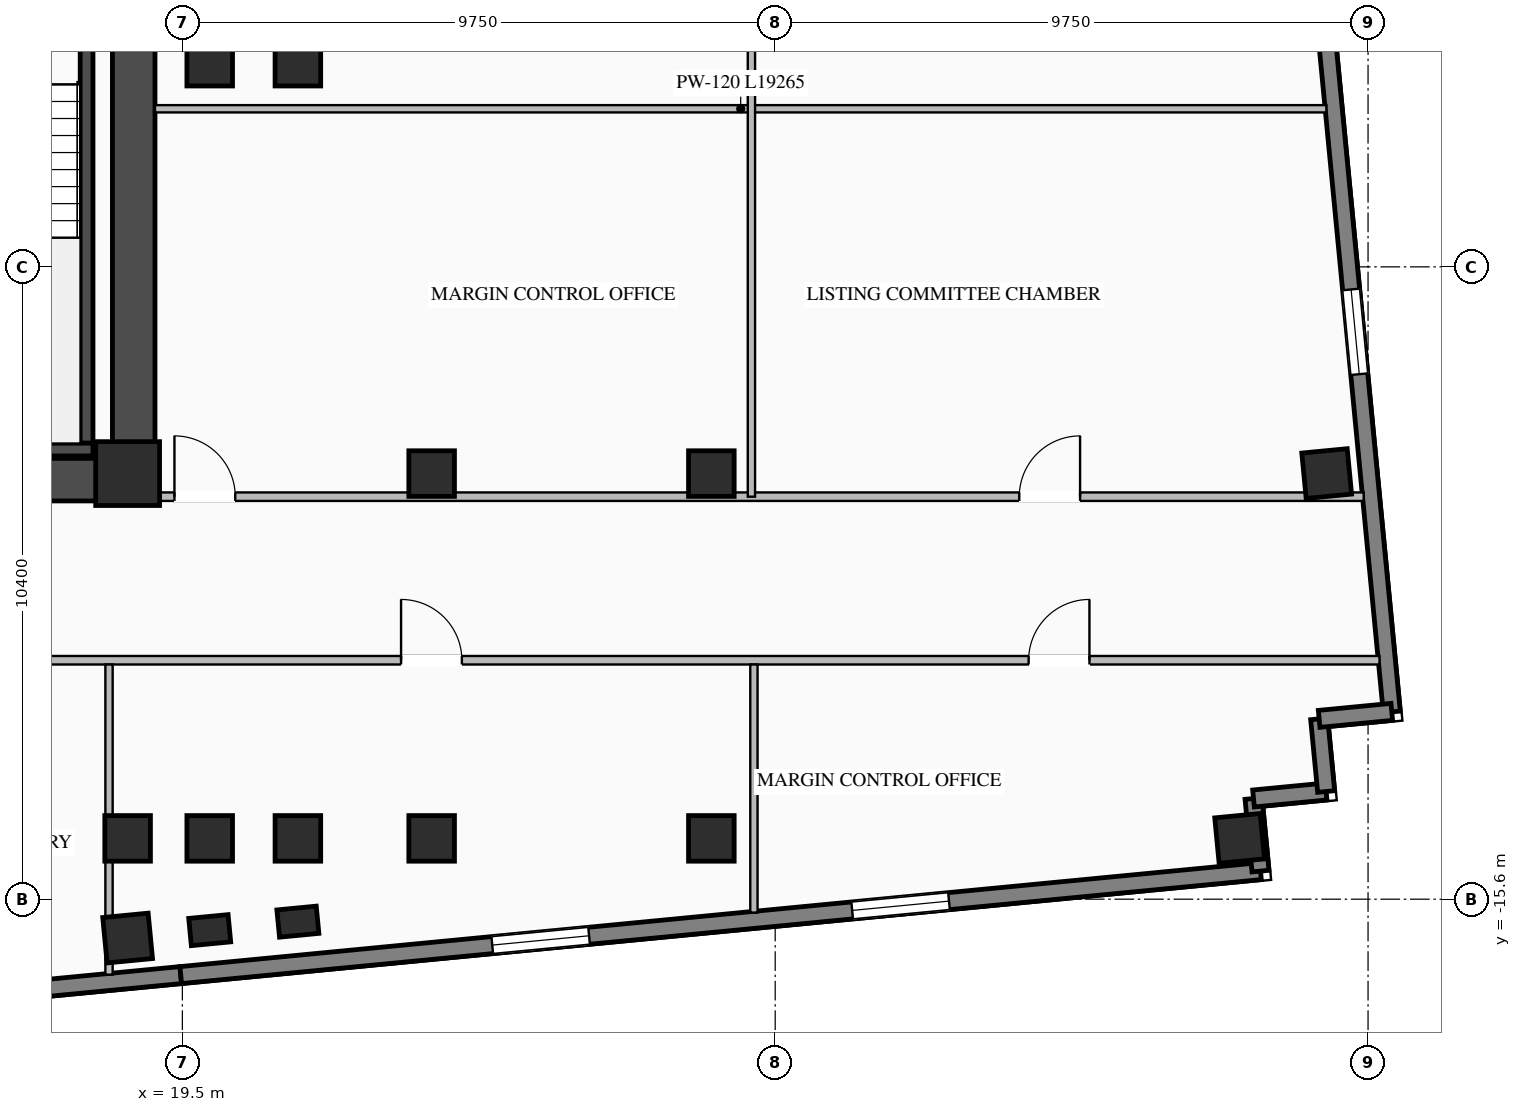
"""IFC4 building model, lengths in metres.
Left out: names, types, materials, properties, quantities, classifications, styles, units other than length and angle.
Written with IfcOpenShell. Run it as: python <this file> out.ifc"""

import sys

from ifc_helpers import new_model, si_unit, direction, frame, frame_2d, origin, origin_2d, place, context, subcontext, project, spatial, rectangle, i_section, extrude, element, fill, save


model = new_model("IFC4")
c1 = context("Model", 3, precision=1e-05, world=origin(), true_north=direction((0.0, 1.0)))
c2 = subcontext(c1, "Body", "Model", "MODEL_VIEW")
j1 = project(units=[si_unit("LENGTHUNIT", "METRE"), si_unit("PLANEANGLEUNIT", "RADIAN")], contexts=[c1])
p1 = place(None, origin())
s1 = spatial("IfcSite", under=j1, at=p1, CompositionType="ELEMENT")
p2 = place(p1, origin())
s2 = spatial("IfcBuilding", under=s1, at=p2, CompositionType="ELEMENT")
p3 = place(p2, frame((0.0, 0.0, 101.8)))
s3 = spatial("IfcBuildingStorey", under=s2, at=p3, CompositionType="ELEMENT", Elevation=101.8)
p4 = place(p3, frame((8.8, -8.7, 0.0), z_axis=(0.0, 0.0, 1.0), x_axis=(1.0, 0.0, 0.0)))
e1 = element("IfcWall", 1, at=p4, inside=s3, PredefinedType="SHEAR", context=c2, shape_type="SweptSolid", body=[
    extrude(rectangle(XDim=10.25, YDim=0.7, at=frame_2d((5.125, 0.0))), origin(), (0.0, 0.0, 1.0), 3.27),
])
p5 = place(p3, frame((18.7, -8.35, 0.0), z_axis=(0.0, 0.0, 1.0), x_axis=(0.0, 1.0, 0.0)))
e2 = element("IfcWall", 2, at=p5, inside=s3, PredefinedType="SHEAR", context=c2, shape_type="SweptSolid", body=[
    extrude(rectangle(XDim=16.7, YDim=0.7, at=frame_2d((8.35, 0.0))), origin(), (0.0, 0.0, 1.0), 3.27),
])
p6 = place(p3, frame((17.925, -8.1, 0.0), z_axis=(0.0, 0.0, 1.0), x_axis=(0.0, 1.0, 0.0)))
e3 = element("IfcWall", 3, at=p6, inside=s3, PredefinedType="SHEAR", context=c2, shape_type="SweptSolid", body=[
    extrude(rectangle(XDim=8.2, YDim=0.21, at=frame_2d((4.1, 0.0))), origin(), (0.0, 0.0, 1.0), 3.27),
])
p7 = place(p3, frame((12.89, -8.205, 0.0), z_axis=(0.0, 0.0, 1.0), x_axis=(1.0, 0.0, 0.0)))
e4 = element("IfcWall", 4, at=p7, inside=s3, PredefinedType="SHEAR", context=c2, shape_type="SweptSolid", body=[
    extrude(rectangle(XDim=5.14, YDim=0.21, at=frame_2d((2.57, 0.0))), origin(), (0.0, 0.0, 1.0), 3.27),
])
p8 = place(p3, frame((18.6, -8.6, 0.0), z_axis=(0.0, 0.0, 1.0), x_axis=(1.0, 0.0, 0.0)))
e5 = element("IfcColumn", 5, at=p8, inside=s3, PredefinedType="COLUMN", context=c2, shape_type="SweptSolid", body=[
    extrude(rectangle(XDim=1.05, YDim=1.05, at=origin_2d()), origin(), (0.0, 0.0, 1.0), 3.45),
])
for number, where, z_axis, x_axis in (
    (6, (18.6, -14.6, 0.0), (0.0, 0.0, 1.0), (1.0, 0.0, 0.0)),
    (7, (19.95, -14.6, 0.0), (0.0, 0.0, 1.0), (1.0, 0.0, 0.0)),
    (8, (21.4, -14.6, 0.0), (0.0, 0.0, 1.0), (1.0, 0.0, 0.0)),
    (9, (19.95, -1.85, 0.0), (0.0, 0.0, 1.0), (1.0, 0.0, 0.0)),
    (10, (21.4, -1.85, 0.0), (0.0, 0.0, 1.0), (1.0, 0.0, 0.0)),
    (11, (23.6, -14.6, 0.0), (0.0, 0.0, 1.0), (1.0, 0.0, 0.0)),
    (12, (23.6, -8.6, 0.0), (0.0, 0.0, 1.0), (1.0, 0.0, 0.0)),
    (13, (28.2, -14.6, 0.0), (0.0, 0.0, 1.0), (1.0, 0.0, 0.0)),
    (14, (28.2, -8.6, 0.0), (0.0, 0.0, 1.0), (1.0, 0.0, 0.0)),
    (15, (18.6, -16.239, 0.0), (0.0, 0.0, 1.0), (0.995, 0.096, 0.0)),
    (16, (36.888, -14.6, 0.0), (0.0, 0.0, 1.0), (0.995, 0.096, 0.0)),
    (17, (38.32, -8.6, 0.0), (0.0, 0.0, 1.0), (0.995, 0.096, 0.0)),
):
    element("IfcColumn", number, at=place(p3, frame(where, z_axis=z_axis, x_axis=x_axis)), inside=s3, PredefinedType="COLUMN", context=c2, shape_type="SweptSolid", body=[
        extrude(i_section(OverallWidth=0.75, OverallDepth=0.75, WebThickness=0.03, FlangeThickness=0.044, at=origin_2d()), origin(), (0.0, 0.0, 1.0), 3.45),
    ])
for number, where, z_axis, x_axis in (
    (18, (19.95, -16.109, 0.0), (0.0, 0.0, 1.0), (0.995, 0.096, 0.0)),
    (19, (21.4, -15.969, 0.0), (0.0, 0.0, 1.0), (0.995, 0.096, 0.0)),
):
    element("IfcColumn", number, at=place(p3, frame(where, z_axis=z_axis, x_axis=x_axis)), inside=s3, PredefinedType="PILASTER", context=c2, shape_type="SweptSolid", body=[
        extrude(rectangle(XDim=0.65, YDim=0.45, at=origin_2d()), origin(), (0.0, 0.0, 1.0), 3.45),
    ])
p9 = place(p3, frame((19.474, -16.848, 0.0), z_axis=(0.0, 0.0, 1.0), x_axis=(-0.995396794462, -0.09583956164, 0.0)))
e20 = element("IfcWall", 20, at=p9, inside=s3, PredefinedType="STANDARD", context=c2, shape_type="SweptSolid", body=[
    extrude(rectangle(XDim=9.0, YDim=0.28, at=frame_2d((4.5, 0.0))), origin(), (0.0, 0.0, 1.0), 3.25),
])
p10 = place(p9, frame((2.2, 0.0, 0.76)))
e21 = element("IfcOpeningElement", 21, at=p10, cuts=e20, PredefinedType="OPENING", context=c2, shape_type="SweptSolid", body=[
    extrude(rectangle(XDim=1.6, YDim=1.95, at=frame_2d((0.8, 0.975))), frame((0.0, 0.15, 0.0), z_axis=(0.0, -1.0, 0.0), x_axis=(1.0, 0.0, 0.0)), (0.0, 0.0, 1.0), 0.3),
])
p11 = place(p9, frame((5.2, 0.0, 0.76)))
e22 = element("IfcOpeningElement", 22, at=p11, cuts=e20, PredefinedType="OPENING", context=c2, shape_type="SweptSolid", body=[
    extrude(rectangle(XDim=1.6, YDim=1.95, at=frame_2d((0.8, 0.975))), frame((0.0, 0.15, 0.0), z_axis=(0.0, -1.0, 0.0), x_axis=(1.0, 0.0, 0.0)), (0.0, 0.0, 1.0), 0.3),
])
p12 = place(p3, frame((37.231, -15.138, 0.0), z_axis=(0.0, 0.0, 1.0), x_axis=(-0.995395780835, -0.095850088663, 0.0)))
e23 = element("IfcWall", 23, at=p12, inside=s3, PredefinedType="STANDARD", context=c2, shape_type="SweptSolid", body=[
    extrude(rectangle(XDim=17.84, YDim=0.28, at=frame_2d((8.92, 0.0))), origin(), (0.0, 0.0, 1.0), 3.25),
])
p13 = place(p12, frame((5.147, 0.0, 0.76)))
e24 = element("IfcOpeningElement", 24, at=p13, cuts=e23, PredefinedType="OPENING", context=c2, shape_type="SweptSolid", body=[
    extrude(rectangle(XDim=1.6, YDim=1.95, at=frame_2d((0.8, 0.975))), frame((0.0, 0.15, 0.0), z_axis=(0.0, -1.0, 0.0), x_axis=(1.0, 0.0, 0.0)), (0.0, 0.0, 1.0), 0.3),
])
p14 = place(p12, frame((11.093, 0.0, 0.76)))
e25 = element("IfcOpeningElement", 25, at=p14, cuts=e23, PredefinedType="OPENING", context=c2, shape_type="SweptSolid", body=[
    extrude(rectangle(XDim=1.6, YDim=1.95, at=frame_2d((0.8, 0.975))), frame((0.0, 0.15, 0.0), z_axis=(0.0, -1.0, 0.0), x_axis=(1.0, 0.0, 0.0)), (0.0, 0.0, 1.0), 0.3),
])
p15 = place(p3, frame((37.585, 6.234, 0.0), z_axis=(0.0, 0.0, 1.0), x_axis=(0.095841297881, -0.99539662729, 0.0)))
e26 = element("IfcWall", 26, at=p15, inside=s3, PredefinedType="STANDARD", context=c2, shape_type="SweptSolid", body=[
    extrude(rectangle(XDim=18.84, YDim=0.28, at=frame_2d((9.42, 0.0))), origin(), (0.0, 0.0, 1.0), 3.25),
])
p16 = place(p15, frame((5.58, 0.0, 0.76)))
e27 = element("IfcOpeningElement", 27, at=p16, cuts=e26, PredefinedType="OPENING", context=c2, shape_type="SweptSolid", body=[
    extrude(rectangle(XDim=1.4, YDim=1.95, at=frame_2d((0.7, 0.975))), frame((0.0, 0.15, 0.0), z_axis=(0.0, -1.0, 0.0), x_axis=(1.0, 0.0, 0.0)), (0.0, 0.0, 1.0), 0.3),
])
p17 = place(p15, frame((11.86, 0.0, 0.76)))
e28 = element("IfcOpeningElement", 28, at=p17, cuts=e26, PredefinedType="OPENING", context=c2, shape_type="SweptSolid", body=[
    extrude(rectangle(XDim=1.4, YDim=1.95, at=frame_2d((0.7, 0.975))), frame((0.0, 0.15, 0.0), z_axis=(0.0, -1.0, 0.0), x_axis=(1.0, 0.0, 0.0)), (0.0, 0.0, 1.0), 0.3),
])
for number, where, z_axis, x_axis in (
    (29, (37.231, -15.138, 0.0), (0.0, 0.0, 1.0), (-0.096, 0.995, 0.0)),
    (30, (37.116, -13.944, 0.0), (0.0, 0.0, 1.0), (0.995, 0.096, 0.0)),
):
    element("IfcWall", number, at=place(p3, frame(where, z_axis=z_axis, x_axis=x_axis)), inside=s3, PredefinedType="STANDARD", context=c2, shape_type="SweptSolid", body=[
        extrude(rectangle(XDim=1.2, YDim=0.28, at=frame_2d((0.6, 0.0))), origin(), (0.0, 0.0, 1.0), 2.495),
    ])
for number, where, z_axis, x_axis in (
    (31, (38.311, -13.829, 0.0), (0.0, 0.0, 1.0), (-0.096, 0.995, 0.0)),
    (32, (38.196, -12.635, 0.0), (0.0, 0.0, 1.0), (0.995, 0.096, 0.0)),
):
    element("IfcWall", number, at=place(p3, frame(where, z_axis=z_axis, x_axis=x_axis)), inside=s3, PredefinedType="STANDARD", context=c2, shape_type="SweptSolid", body=[
        extrude(rectangle(XDim=1.2, YDim=0.28, at=frame_2d((0.6, 0.0))), origin(), (0.0, 0.0, 1.0), 2.495),
    ])
p18 = place(p3, frame((-28.363, -11.67, 0.0), z_axis=(0.0, 0.0, 1.0), x_axis=(1.0, 0.0, 0.0)))
e33 = element("IfcWall", 33, at=p18, inside=s3, PredefinedType="STANDARD", context=c2, shape_type="SweptSolid", body=[
    extrude(rectangle(XDim=67.551, YDim=0.14, at=frame_2d((33.775, 0.0))), origin(), (0.0, 0.0, 1.0), 3.25),
])
p19 = place(p18, frame((28.453, 0.0, 0.0)))
e34 = element("IfcOpeningElement", 34, at=p19, cuts=e33, PredefinedType="OPENING", context=c2, shape_type="SweptSolid", body=[
    extrude(rectangle(XDim=0.92, YDim=2.08, at=frame_2d((0.46, 1.04))), frame((0.0, 0.08, 0.0), z_axis=(0.0, -1.0, 0.0), x_axis=(1.0, 0.0, 0.0)), (0.0, 0.0, 1.0), 0.16),
])
p20 = place(p18, frame((31.953, 0.0, 0.0)))
e35 = element("IfcOpeningElement", 35, at=p20, cuts=e33, PredefinedType="OPENING", context=c2, shape_type="SweptSolid", body=[
    extrude(rectangle(XDim=0.92, YDim=2.08, at=frame_2d((0.46, 1.04))), frame((0.0, 0.08, 0.0), z_axis=(0.0, -1.0, 0.0), x_axis=(1.0, 0.0, 0.0)), (0.0, 0.0, 1.0), 0.16),
])
p21 = place(p18, frame((34.803, 0.0, 0.0)))
e36 = element("IfcOpeningElement", 36, at=p21, cuts=e33, PredefinedType="OPENING", context=c2, shape_type="SweptSolid", body=[
    extrude(rectangle(XDim=0.92, YDim=2.08, at=frame_2d((0.46, 1.04))), frame((0.0, 0.08, 0.0), z_axis=(0.0, -1.0, 0.0), x_axis=(1.0, 0.0, 0.0)), (0.0, 0.0, 1.0), 0.16),
])
p22 = place(p18, frame((4.13, 0.0, 0.0)))
e37 = element("IfcOpeningElement", 37, at=p22, cuts=e33, PredefinedType="OPENING", context=c2, shape_type="SweptSolid", body=[
    extrude(rectangle(XDim=1.0, YDim=2.08, at=frame_2d((0.5, 1.04))), frame((0.0, 0.08, 0.0), z_axis=(0.0, -1.0, 0.0), x_axis=(1.0, 0.0, 0.0)), (0.0, 0.0, 1.0), 0.16),
])
p23 = place(p18, frame((13.115, 0.0, 0.0)))
e38 = element("IfcOpeningElement", 38, at=p23, cuts=e33, PredefinedType="OPENING", context=c2, shape_type="SweptSolid", body=[
    extrude(rectangle(XDim=1.0, YDim=2.08, at=frame_2d((0.5, 1.04))), frame((0.0, 0.08, 0.0), z_axis=(0.0, -1.0, 0.0), x_axis=(1.0, 0.0, 0.0)), (0.0, 0.0, 1.0), 0.16),
])
p24 = place(p18, frame((22.192, 0.0, 0.0)))
e39 = element("IfcOpeningElement", 39, at=p24, cuts=e33, PredefinedType="OPENING", context=c2, shape_type="SweptSolid", body=[
    extrude(rectangle(XDim=1.0, YDim=2.08, at=frame_2d((0.5, 1.04))), frame((0.0, 0.08, 0.0), z_axis=(0.0, -1.0, 0.0), x_axis=(1.0, 0.0, 0.0)), (0.0, 0.0, 1.0), 0.16),
])
p25 = place(p18, frame((41.01, 0.0, 0.0)))
e40 = element("IfcOpeningElement", 40, at=p25, cuts=e33, PredefinedType="OPENING", context=c2, shape_type="SweptSolid", body=[
    extrude(rectangle(XDim=1.0, YDim=2.08, at=frame_2d((0.5, 1.04))), frame((0.0, 0.08, 0.0), z_axis=(0.0, -1.0, 0.0), x_axis=(1.0, 0.0, 0.0)), (0.0, 0.0, 1.0), 0.16),
])
p26 = place(p18, frame((51.46, 0.0, 0.0)))
e41 = element("IfcOpeningElement", 41, at=p26, cuts=e33, PredefinedType="OPENING", context=c2, shape_type="SweptSolid", body=[
    extrude(rectangle(XDim=1.0, YDim=2.08, at=frame_2d((0.5, 1.04))), frame((0.0, 0.08, 0.0), z_axis=(0.0, -1.0, 0.0), x_axis=(1.0, 0.0, 0.0)), (0.0, 0.0, 1.0), 0.16),
])
p27 = place(p18, frame((61.781, 0.0, 0.0)))
e42 = element("IfcOpeningElement", 42, at=p27, cuts=e33, PredefinedType="OPENING", context=c2, shape_type="SweptSolid", body=[
    extrude(rectangle(XDim=1.0, YDim=2.08, at=frame_2d((0.5, 1.04))), frame((0.0, 0.08, 0.0), z_axis=(0.0, -1.0, 0.0), x_axis=(1.0, 0.0, 0.0)), (0.0, 0.0, 1.0), 0.16),
])
p28 = place(p3, frame((18.294, -16.841, 0.0), z_axis=(0.0, 0.0, 1.0), x_axis=(0.0, 1.0, 0.0)))
e43 = element("IfcWall", 43, at=p28, inside=s3, PredefinedType="STANDARD", context=c2, shape_type="SweptSolid", body=[
    extrude(rectangle(XDim=5.101, YDim=0.12, at=frame_2d((2.551, 0.0))), origin(), (0.0, 0.0, 1.0), 3.25),
])
p29 = place(p3, frame((28.9, -15.82, 0.0), z_axis=(0.0, 0.0, 1.0), x_axis=(0.0, 1.0, 0.0)))
e44 = element("IfcWall", 44, at=p29, inside=s3, PredefinedType="STANDARD", context=c2, shape_type="SweptSolid", body=[
    extrude(rectangle(XDim=4.08, YDim=0.12, at=frame_2d((2.04, 0.0))), origin(), (0.0, 0.0, 1.0), 3.25),
])
p30 = place(p3, frame((19.05, -8.98, 0.0), z_axis=(0.0, 0.0, 1.0), x_axis=(1.0, 0.0, 0.0)))
e45 = element("IfcWall", 45, at=p30, inside=s3, PredefinedType="STANDARD", context=c2, shape_type="SweptSolid", body=[
    extrude(rectangle(XDim=19.879, YDim=0.14, at=frame_2d((9.939, 0.0))), origin(), (0.0, 0.0, 1.0), 3.25),
])
p31 = place(p30, frame((0.32, 0.0, 0.0)))
e46 = element("IfcOpeningElement", 46, at=p31, cuts=e45, PredefinedType="OPENING", context=c2, shape_type="SweptSolid", body=[
    extrude(rectangle(XDim=1.0, YDim=2.08, at=frame_2d((0.5, 1.04))), frame((0.0, 0.08, 0.0), z_axis=(0.0, -1.0, 0.0), x_axis=(1.0, 0.0, 0.0)), (0.0, 0.0, 1.0), 0.16),
])
p32 = place(p30, frame((14.214, 0.0, 0.0)))
e47 = element("IfcOpeningElement", 47, at=p32, cuts=e45, PredefinedType="OPENING", context=c2, shape_type="SweptSolid", body=[
    extrude(rectangle(XDim=1.0, YDim=2.08, at=frame_2d((0.5, 1.04))), frame((0.0, 0.08, 0.0), z_axis=(0.0, -1.0, 0.0), x_axis=(1.0, 0.0, 0.0)), (0.0, 0.0, 1.0), 0.16),
])
p33 = place(p3, frame((19.05, -2.6, 0.0), z_axis=(0.0, 0.0, 1.0), x_axis=(1.0, 0.0, 0.0)))
e48 = element("IfcWall", 48, at=p33, inside=s3, PredefinedType="STANDARD", context=c2, shape_type="SweptSolid", body=[
    extrude(rectangle(XDim=19.265, YDim=0.12, at=frame_2d((9.632, 0.0))), origin(), (0.0, 0.0, 1.0), 3.25),
])
p34 = place(p3, frame((28.859, -8.98, 0.0), z_axis=(0.0, 0.0, 1.0), x_axis=(0.0, 1.0, 0.0)))
e49 = element("IfcWall", 49, at=p34, inside=s3, PredefinedType="STANDARD", context=c2, shape_type="SweptSolid", body=[
    extrude(rectangle(XDim=17.96, YDim=0.12, at=frame_2d((8.98, 0.0))), origin(), (0.0, 0.0, 1.0), 3.25),
])
p35 = place(p13, origin())
e50 = element("IfcWindow", 50, at=p35, inside=s3, PartitioningType="SINGLE_PANEL", PredefinedType="WINDOW", context=c2, shape_type="SweptSolid", body=[
    extrude(rectangle(XDim=1.6, YDim=1.95, at=frame_2d((0.8, 0.975))), frame((0.0, 0.03, 0.0), z_axis=(0.0, -1.0, 0.0), x_axis=(1.0, 0.0, 0.0)), (0.0, 0.0, 1.0), 0.06),
])
fill(e24, e50)
p36 = place(p14, origin())
e51 = element("IfcWindow", 51, at=p36, inside=s3, PartitioningType="SINGLE_PANEL", PredefinedType="WINDOW", context=c2, shape_type="SweptSolid", body=[
    extrude(rectangle(XDim=1.6, YDim=1.95, at=frame_2d((0.8, 0.975))), frame((0.0, 0.03, 0.0), z_axis=(0.0, -1.0, 0.0), x_axis=(1.0, 0.0, 0.0)), (0.0, 0.0, 1.0), 0.06),
])
fill(e25, e51)
p37 = place(p17, origin())
e52 = element("IfcWindow", 52, at=p37, inside=s3, PartitioningType="SINGLE_PANEL", PredefinedType="WINDOW", context=c2, shape_type="SweptSolid", body=[
    extrude(rectangle(XDim=1.4, YDim=1.95, at=frame_2d((0.7, 0.975))), frame((0.0, 0.03, 0.0), z_axis=(0.0, -1.0, 0.0), x_axis=(1.0, 0.0, 0.0)), (0.0, 0.0, 1.0), 0.06),
])
fill(e28, e52)
p38 = place(p26, origin())
e53 = element("IfcDoor", 53, at=p38, inside=s3, OperationType="SINGLE_SWING_LEFT", PredefinedType="DOOR", context=c2, shape_type="SweptSolid", body=[
    extrude(rectangle(XDim=1.0, YDim=2.08, at=frame_2d((0.5, 1.04))), frame((0.0, 0.025, 0.0), z_axis=(0.0, -1.0, 0.0), x_axis=(1.0, 0.0, 0.0)), (0.0, 0.0, 1.0), 0.05),
])
fill(e41, e53)
p39 = place(p27, origin())
e54 = element("IfcDoor", 54, at=p39, inside=s3, OperationType="SINGLE_SWING_RIGHT", PredefinedType="DOOR", context=c2, shape_type="SweptSolid", body=[
    extrude(rectangle(XDim=1.0, YDim=2.08, at=frame_2d((0.5, 1.04))), frame((0.0, 0.025, 0.0), z_axis=(0.0, -1.0, 0.0), x_axis=(1.0, 0.0, 0.0)), (0.0, 0.0, 1.0), 0.05),
])
fill(e42, e54)
p40 = place(p31, origin())
e55 = element("IfcDoor", 55, at=p40, inside=s3, OperationType="SINGLE_SWING_LEFT", PredefinedType="DOOR", context=c2, shape_type="SweptSolid", body=[
    extrude(rectangle(XDim=1.0, YDim=2.08, at=frame_2d((0.5, 1.04))), frame((0.0, 0.025, 0.0), z_axis=(0.0, -1.0, 0.0), x_axis=(1.0, 0.0, 0.0)), (0.0, 0.0, 1.0), 0.05),
])
fill(e46, e55)
p41 = place(p32, origin())
e56 = element("IfcDoor", 56, at=p41, inside=s3, OperationType="SINGLE_SWING_RIGHT", PredefinedType="DOOR", context=c2, shape_type="SweptSolid", body=[
    extrude(rectangle(XDim=1.0, YDim=2.08, at=frame_2d((0.5, 1.04))), frame((0.0, 0.025, 0.0), z_axis=(0.0, -1.0, 0.0), x_axis=(1.0, 0.0, 0.0)), (0.0, 0.0, 1.0), 0.05),
])
fill(e47, e56)
save(model, sys.argv[1])
